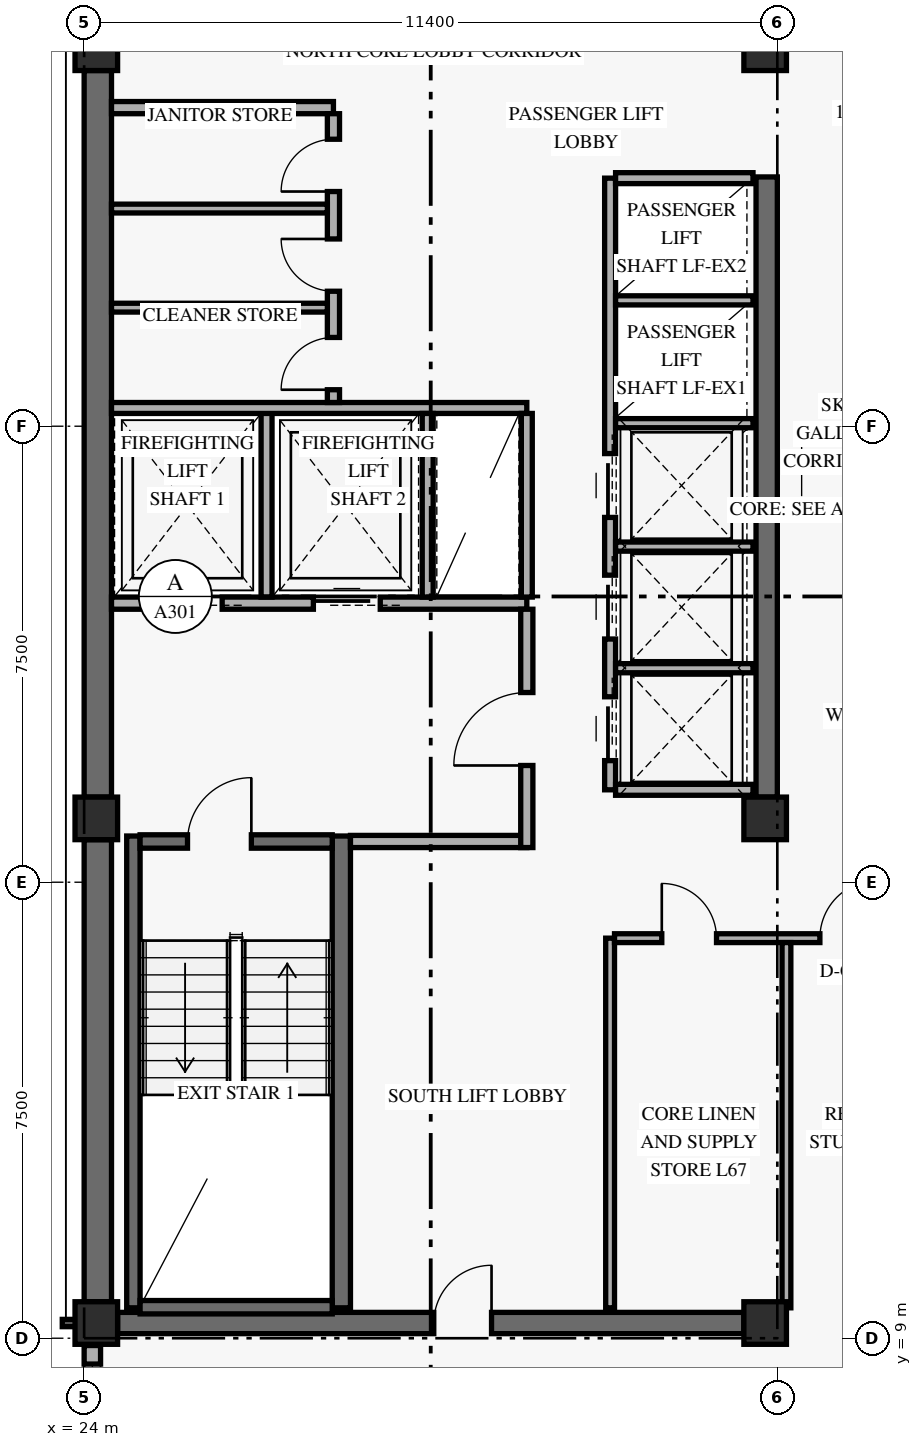
"""IFC4 building model, lengths in metres.
Left out: names, types, materials, properties, quantities, classifications, styles, units other than length and angle.
Written with IfcOpenShell. Run it as: python <this file> out.ifc"""

import sys

from ifc_helpers import new_model, si_unit, direction, frame, frame_2d, origin, origin_2d, place, context, subcontext, project, spatial, rectangle, extrude, element, fill, save


model = new_model("IFC4")
c1 = context("Model", 3, precision=1e-05, world=origin(), true_north=direction((0.0, 1.0)))
c2 = subcontext(c1, "Body", "Model", "MODEL_VIEW")
j1 = project(units=[si_unit("LENGTHUNIT", "METRE"), si_unit("PLANEANGLEUNIT", "RADIAN")], contexts=[c1])
p1 = place(None, origin())
s1 = spatial("IfcSite", under=j1, at=p1, CompositionType="ELEMENT")
p2 = place(p1, origin())
s2 = spatial("IfcBuilding", under=s1, at=p2, CompositionType="ELEMENT")
p3 = place(p2, frame((0.0, 0.0, 256.8)))
s3 = spatial("IfcBuildingStorey", under=s2, at=p3, CompositionType="ELEMENT", Elevation=256.8)
p4 = place(p3, frame((24.225, 9.6, 0.0), z_axis=(0.0, 0.0, 1.0), x_axis=(0.0, 1.0, 0.0)))
e1 = element("IfcWall", 1, at=p4, inside=s3, PredefinedType="SHEAR", context=c2, shape_type="SweptSolid", body=[
    extrude(rectangle(XDim=7.6, YDim=0.45, at=frame_2d((3.8, 0.0))), origin(), (0.0, 0.0, 1.0), 2.821),
])
p5 = place(p3, frame((24.225, 17.9, 0.0), z_axis=(0.0, 0.0, 1.0), x_axis=(0.0, 1.0, 0.0)))
e2 = element("IfcWall", 2, at=p5, inside=s3, PredefinedType="SHEAR", context=c2, shape_type="SweptSolid", body=[
    extrude(rectangle(XDim=11.95, YDim=0.45, at=frame_2d((5.975, 0.0))), origin(), (0.0, 0.0, 1.0), 2.821),
])
p6 = place(p3, frame((35.225, 17.9, 0.0), z_axis=(0.0, 0.0, 1.0), x_axis=(0.0, 1.0, 0.0)))
e3 = element("IfcWall", 3, at=p6, inside=s3, PredefinedType="SHEAR", context=c2, shape_type="SweptSolid", body=[
    extrude(rectangle(XDim=10.2, YDim=0.35, at=frame_2d((5.1, 0.0))), origin(), (0.0, 0.0, 1.0), 2.821),
])
p7 = place(p3, frame((24.55, 9.25, 0.0), z_axis=(0.0, 0.0, 1.0), x_axis=(1.0, 0.0, 0.0)))
e4 = element("IfcWall", 4, at=p7, inside=s3, PredefinedType="SHEAR", context=c2, shape_type="SweptSolid", body=[
    extrude(rectangle(XDim=10.3, YDim=0.35, at=frame_2d((5.15, 0.0))), origin(), (0.0, 0.0, 1.0), 3.36),
])
p8 = place(p7, frame((5.2, 0.0, 0.0)))
e5 = element("IfcOpeningElement", 5, at=p8, cuts=e4, PredefinedType="OPENING", context=c2, shape_type="SweptSolid", body=[
    extrude(rectangle(XDim=0.95, YDim=2.15, at=frame_2d((0.475, 1.075))), frame((0.0, 0.185, 0.0), z_axis=(0.0, -1.0, 0.0), x_axis=(1.0, 0.0, 0.0)), (0.0, 0.0, 1.0), 0.37),
])
p9 = place(p3, frame((24.81, 9.5, 0.0), z_axis=(0.0, 0.0, 1.0), x_axis=(0.0, 1.0, 0.0)))
e6 = element("IfcWall", 6, at=p9, inside=s3, PredefinedType="SHEAR", context=c2, shape_type="SweptSolid", body=[
    extrude(rectangle(XDim=7.76, YDim=0.22, at=frame_2d((3.88, 0.0))), origin(), (0.0, 0.0, 1.0), 3.36),
])
p10 = place(p3, frame((28.23, 9.5, 0.0), z_axis=(0.0, 0.0, 1.0), x_axis=(0.0, 1.0, 0.0)))
e7 = element("IfcWall", 7, at=p10, inside=s3, PredefinedType="SHEAR", context=c2, shape_type="SweptSolid", body=[
    extrude(rectangle(XDim=7.76, YDim=0.3, at=frame_2d((3.88, 0.0))), origin(), (0.0, 0.0, 1.0), 3.36),
])
p11 = place(p3, frame((24.92, 9.51, 0.0), z_axis=(0.0, 0.0, 1.0), x_axis=(1.0, 0.0, 0.0)))
e8 = element("IfcWall", 8, at=p11, inside=s3, PredefinedType="SHEAR", context=c2, shape_type="SweptSolid", body=[
    extrude(rectangle(XDim=3.16, YDim=0.22, at=frame_2d((1.58, 0.0))), origin(), (0.0, 0.0, 1.0), 3.36),
])
p12 = place(p3, frame((24.92, 17.17, 0.0), z_axis=(0.0, 0.0, 1.0), x_axis=(1.0, 0.0, 0.0)))
e9 = element("IfcWall", 9, at=p12, inside=s3, PredefinedType="SHEAR", context=c2, shape_type="SweptSolid", body=[
    extrude(rectangle(XDim=3.16, YDim=0.22, at=frame_2d((1.58, 0.0))), origin(), (0.0, 0.0, 1.0), 3.36),
])
p13 = place(p12, frame((0.78, 0.0, 0.0)))
e10 = element("IfcOpeningElement", 10, at=p13, cuts=e9, PredefinedType="OPENING", context=c2, shape_type="SweptSolid", body=[
    extrude(rectangle(XDim=1.05, YDim=2.15, at=frame_2d((0.525, 1.075))), frame((0.0, 0.12, 0.0), z_axis=(0.0, -1.0, 0.0), x_axis=(1.0, 0.0, 0.0)), (0.0, 0.0, 1.0), 0.24),
])
for number, where, z_axis, x_axis in (
    (11, (24.2, 9.25, 0.0), (0.0, 0.0, 1.0), (1.0, 0.0, 0.0)),
    (12, (24.2, 17.55, 0.0), (0.0, 0.0, 1.0), (1.0, 0.0, 0.0)),
    (13, (24.2, 30.2, 0.0), (0.0, 0.0, 1.0), (1.0, 0.0, 0.0)),
    (14, (35.2, 9.25, 0.0), (0.0, 0.0, 1.0), (1.0, 0.0, 0.0)),
    (15, (35.2, 17.55, 0.0), (0.0, 0.0, 1.0), (1.0, 0.0, 0.0)),
    (16, (35.2, 30.2, 0.0), (0.0, 0.0, 1.0), (1.0, 0.0, 0.0)),
):
    element("IfcColumn", number, at=place(p3, frame(where, z_axis=z_axis, x_axis=x_axis)), inside=s3, PredefinedType="COLUMN", context=c2, shape_type="SweptSolid", body=[
        extrude(rectangle(XDim=0.7, YDim=0.7, at=origin_2d()), origin(), (0.0, 0.0, 1.0), 3.6),
    ])
p14 = place(p3, frame((24.135, 7.32, 0.0), z_axis=(0.0, 0.0, 1.0), x_axis=(0.0, 1.0, 0.0)))
e17 = element("IfcWall", 17, at=p14, inside=s3, PredefinedType="SOLIDWALL", context=c2, shape_type="SweptSolid", body=[
    extrude(rectangle(XDim=1.56, YDim=0.27, at=frame_2d((0.78, 0.0))), origin(), (0.0, 0.0, 1.0), 2.803),
])
p15 = place(p14, frame((0.305, 0.0, 0.85)))
e18 = element("IfcOpeningElement", 18, at=p15, cuts=e17, PredefinedType="OPENING", context=c2, shape_type="SweptSolid", body=[
    extrude(rectangle(XDim=0.95, YDim=1.5, at=frame_2d((0.475, 0.75))), frame((0.0, 0.145, 0.0), z_axis=(0.0, -1.0, 0.0), x_axis=(1.0, 0.0, 0.0)), (0.0, 0.0, 1.0), 0.29),
])
p16 = place(p3, frame((24.45, 21.09, 0.0), z_axis=(0.0, 0.0, 1.0), x_axis=(1.0, 0.0, 0.0)))
e19 = element("IfcWall", 19, at=p16, inside=s3, PredefinedType="STANDARD", context=c2, shape_type="SweptSolid", body=[
    extrude(rectangle(XDim=6.83, YDim=0.2, at=frame_2d((3.415, 0.0))), origin(), (0.0, 0.0, 1.0), 3.36),
])
p17 = place(p16, frame((0.72, 0.0, 0.0)))
e20 = element("IfcOpeningElement", 20, at=p17, cuts=e19, PredefinedType="OPENING", context=c2, shape_type="SweptSolid", body=[
    extrude(rectangle(XDim=1.1, YDim=2.2, at=frame_2d((0.55, 1.1))), frame((0.0, 0.11, 0.0), z_axis=(0.0, -1.0, 0.0), x_axis=(1.0, 0.0, 0.0)), (0.0, 0.0, 1.0), 0.22),
])
p18 = place(p16, frame((3.32, 0.0, 0.0)))
e21 = element("IfcOpeningElement", 21, at=p18, cuts=e19, PredefinedType="OPENING", context=c2, shape_type="SweptSolid", body=[
    extrude(rectangle(XDim=1.1, YDim=2.2, at=frame_2d((0.55, 1.1))), frame((0.0, 0.11, 0.0), z_axis=(0.0, -1.0, 0.0), x_axis=(1.0, 0.0, 0.0)), (0.0, 0.0, 1.0), 0.22),
])
p19 = place(p3, frame((28.38, 17.17, 0.0), z_axis=(0.0, 0.0, 1.0), x_axis=(1.0, 0.0, 0.0)))
e22 = element("IfcWall", 22, at=p19, inside=s3, PredefinedType="STANDARD", context=c2, shape_type="SweptSolid", body=[
    extrude(rectangle(XDim=2.9, YDim=0.2, at=frame_2d((1.45, 0.0))), origin(), (0.0, 0.0, 1.0), 3.36),
])
p20 = place(p3, frame((31.28, 17.07, 0.0), z_axis=(0.0, 0.0, 1.0), x_axis=(0.0, 1.0, 0.0)))
e23 = element("IfcWall", 23, at=p20, inside=s3, PredefinedType="STANDARD", context=c2, shape_type="SweptSolid", body=[
    extrude(rectangle(XDim=3.92, YDim=0.2, at=frame_2d((1.96, 0.0))), origin(), (0.0, 0.0, 1.0), 2.803),
])
p21 = place(p20, frame((1.35, 0.0, 0.0)))
e24 = element("IfcOpeningElement", 24, at=p21, cuts=e23, PredefinedType="OPENING", context=c2, shape_type="SweptSolid", body=[
    extrude(rectangle(XDim=1.2, YDim=2.15, at=frame_2d((0.6, 1.075))), frame((0.0, 0.11, 0.0), z_axis=(0.0, -1.0, 0.0), x_axis=(1.0, 0.0, 0.0)), (0.0, 0.0, 1.0), 0.22),
])
p22 = place(p3, frame((27.0, 21.19, 0.0), z_axis=(0.0, 0.0, 1.0), x_axis=(0.0, 1.0, 0.0)))
e25 = element("IfcWall", 25, at=p22, inside=s3, PredefinedType="STANDARD", context=c2, shape_type="SweptSolid", body=[
    extrude(rectangle(XDim=3.11, YDim=0.18, at=frame_2d((1.555, 0.0))), origin(), (0.0, 0.0, 1.0), 3.36),
])
p23 = place(p3, frame((24.45, 24.3, 0.0), z_axis=(0.0, 0.0, 1.0), x_axis=(1.0, 0.0, 0.0)))
e26 = element("IfcWall", 26, at=p23, inside=s3, PredefinedType="STANDARD", context=c2, shape_type="SweptSolid", body=[
    extrude(rectangle(XDim=6.83, YDim=0.18, at=frame_2d((3.415, 0.0))), origin(), (0.0, 0.0, 1.0), 3.36),
])
for number, where, z_axis, x_axis in (
    (27, (29.65, 21.19, 0.0), (0.0, 0.0, 1.0), (0.0, 1.0, 0.0)),
    (28, (31.28, 21.19, 0.0), (0.0, 0.0, 1.0), (0.0, 1.0, 0.0)),
):
    element("IfcWall", number, at=place(p3, frame(where, z_axis=z_axis, x_axis=x_axis)), inside=s3, PredefinedType="STANDARD", context=c2, shape_type="SweptSolid", body=[
        extrude(rectangle(XDim=3.02, YDim=0.18, at=frame_2d((1.51, 0.0))), origin(), (0.0, 0.0, 1.0), 3.36),
    ])
p24 = place(p3, frame((24.45, 29.24, 0.0), z_axis=(0.0, 0.0, 1.0), x_axis=(1.0, 0.0, 0.0)))
e29 = element("IfcWall", 29, at=p24, inside=s3, PredefinedType="STANDARD", context=c2, shape_type="SweptSolid", body=[
    extrude(rectangle(XDim=3.65, YDim=0.2, at=frame_2d((1.825, 0.0))), origin(), (0.0, 0.0, 1.0), 3.36),
])
p25 = place(p3, frame((28.1, 24.39, 0.0), z_axis=(0.0, 0.0, 1.0), x_axis=(0.0, 1.0, 0.0)))
e30 = element("IfcWall", 30, at=p25, inside=s3, PredefinedType="STANDARD", context=c2, shape_type="SweptSolid", body=[
    extrude(rectangle(XDim=4.75, YDim=0.2, at=frame_2d((2.375, 0.0))), origin(), (0.0, 0.0, 1.0), 3.36),
])
p26 = place(p25, frame((0.21, 0.0, 0.0)))
e31 = element("IfcOpeningElement", 31, at=p26, cuts=e30, PredefinedType="OPENING", context=c2, shape_type="SweptSolid", body=[
    extrude(rectangle(XDim=0.86, YDim=2.1, at=frame_2d((0.43, 1.05))), frame((0.0, 0.11, 0.0), z_axis=(0.0, -1.0, 0.0), x_axis=(1.0, 0.0, 0.0)), (0.0, 0.0, 1.0), 0.22),
])
p27 = place(p25, frame((1.83, 0.0, 0.0)))
e32 = element("IfcOpeningElement", 32, at=p27, cuts=e30, PredefinedType="OPENING", context=c2, shape_type="SweptSolid", body=[
    extrude(rectangle(XDim=0.86, YDim=2.1, at=frame_2d((0.43, 1.05))), frame((0.0, 0.11, 0.0), z_axis=(0.0, -1.0, 0.0), x_axis=(1.0, 0.0, 0.0)), (0.0, 0.0, 1.0), 0.22),
])
p28 = place(p25, frame((3.47, 0.0, 0.0)))
e33 = element("IfcOpeningElement", 33, at=p28, cuts=e30, PredefinedType="OPENING", context=c2, shape_type="SweptSolid", body=[
    extrude(rectangle(XDim=0.86, YDim=2.1, at=frame_2d((0.43, 1.05))), frame((0.0, 0.11, 0.0), z_axis=(0.0, -1.0, 0.0), x_axis=(1.0, 0.0, 0.0)), (0.0, 0.0, 1.0), 0.22),
])
for number, where, z_axis, x_axis in (
    (34, (24.45, 25.95, 0.0), (0.0, 0.0, 1.0), (1.0, 0.0, 0.0)),
    (35, (24.45, 27.58, 0.0), (0.0, 0.0, 1.0), (1.0, 0.0, 0.0)),
):
    element("IfcWall", number, at=place(p3, frame(where, z_axis=z_axis, x_axis=x_axis)), inside=s3, PredefinedType="PARTITIONING", context=c2, shape_type="SweptSolid", body=[
        extrude(rectangle(XDim=3.55, YDim=0.145, at=frame_2d((1.775, 0.0))), origin(), (0.0, 0.0, 1.0), 3.36),
    ])
p29 = place(p3, frame((32.65, 18.02, 0.0), z_axis=(0.0, 0.0, 1.0), x_axis=(0.0, 1.0, 0.0)))
e36 = element("IfcWall", 36, at=p29, inside=s3, PredefinedType="STANDARD", context=c2, shape_type="SweptSolid", body=[
    extrude(rectangle(XDim=10.06, YDim=0.18, at=frame_2d((5.03, 0.0))), origin(), (0.0, 0.0, 1.0), 3.36),
])
p30 = place(p29, frame((0.48, 0.0, 0.0)))
e37 = element("IfcOpeningElement", 37, at=p30, cuts=e36, PredefinedType="OPENING", context=c2, shape_type="SweptSolid", body=[
    extrude(rectangle(XDim=1.05, YDim=2.2, at=frame_2d((0.525, 1.1))), frame((0.0, 0.1, 0.0), z_axis=(0.0, -1.0, 0.0), x_axis=(1.0, 0.0, 0.0)), (0.0, 0.0, 1.0), 0.2),
])
p31 = place(p29, frame((2.48, 0.0, 0.0)))
e38 = element("IfcOpeningElement", 38, at=p31, cuts=e36, PredefinedType="OPENING", context=c2, shape_type="SweptSolid", body=[
    extrude(rectangle(XDim=1.05, YDim=2.2, at=frame_2d((0.525, 1.1))), frame((0.0, 0.1, 0.0), z_axis=(0.0, -1.0, 0.0), x_axis=(1.0, 0.0, 0.0)), (0.0, 0.0, 1.0), 0.2),
])
p32 = place(p29, frame((4.48, 0.0, 0.0)))
e39 = element("IfcOpeningElement", 39, at=p32, cuts=e36, PredefinedType="OPENING", context=c2, shape_type="SweptSolid", body=[
    extrude(rectangle(XDim=1.05, YDim=2.2, at=frame_2d((0.525, 1.1))), frame((0.0, 0.1, 0.0), z_axis=(0.0, -1.0, 0.0), x_axis=(1.0, 0.0, 0.0)), (0.0, 0.0, 1.0), 0.2),
])
for number, where, z_axis, x_axis in (
    (40, (32.74, 18.02, 0.0), (0.0, 0.0, 1.0), (1.0, 0.0, 0.0)),
    (41, (32.74, 28.08, 0.0), (0.0, 0.0, 1.0), (1.0, 0.0, 0.0)),
):
    element("IfcWall", number, at=place(p3, frame(where, z_axis=z_axis, x_axis=x_axis)), inside=s3, PredefinedType="STANDARD", context=c2, shape_type="SweptSolid", body=[
        extrude(rectangle(XDim=2.26, YDim=0.18, at=frame_2d((1.13, 0.0))), origin(), (0.0, 0.0, 1.0), 3.36),
    ])
for number, where, z_axis, x_axis in (
    (42, (32.74, 20.02, 0.0), (0.0, 0.0, 1.0), (1.0, 0.0, 0.0)),
    (43, (32.74, 22.02, 0.0), (0.0, 0.0, 1.0), (1.0, 0.0, 0.0)),
    (44, (32.74, 24.05, 0.0), (0.0, 0.0, 1.0), (1.0, 0.0, 0.0)),
    (45, (32.74, 26.07, 0.0), (0.0, 0.0, 1.0), (1.0, 0.0, 0.0)),
):
    element("IfcWall", number, at=place(p3, frame(where, z_axis=z_axis, x_axis=x_axis)), inside=s3, PredefinedType="STANDARD", context=c2, shape_type="SweptSolid", body=[
        extrude(rectangle(XDim=2.26, YDim=0.15, at=frame_2d((1.13, 0.0))), origin(), (0.0, 0.0, 1.0), 3.36),
    ])
p33 = place(p3, frame((32.65, 9.5, 0.0), z_axis=(0.0, 0.0, 1.0), x_axis=(0.0, 1.0, 0.0)))
e46 = element("IfcWall", 46, at=p33, inside=s3, PredefinedType="PARTITIONING", context=c2, shape_type="SweptSolid", body=[
    extrude(rectangle(XDim=6.08, YDim=0.145, at=frame_2d((3.04, 0.0))), origin(), (0.0, 0.0, 1.0), 3.36),
])
p34 = place(p3, frame((32.722, 15.58, 0.0), z_axis=(0.0, 0.0, 1.0), x_axis=(1.0, 0.0, 0.0)))
e47 = element("IfcWall", 47, at=p34, inside=s3, PredefinedType="PARTITIONING", context=c2, shape_type="SweptSolid", body=[
    extrude(rectangle(XDim=5.628, YDim=0.145, at=frame_2d((2.814, 0.0))), origin(), (0.0, 0.0, 1.0), 2.803),
])
p35 = place(p34, frame((0.778, 0.0, 0.0)))
e48 = element("IfcOpeningElement", 48, at=p35, cuts=e47, PredefinedType="OPENING", context=c2, shape_type="SweptSolid", body=[
    extrude(rectangle(XDim=0.9, YDim=2.1, at=frame_2d((0.45, 1.05))), frame((0.0, 0.083, 0.0), z_axis=(0.0, -1.0, 0.0), x_axis=(1.0, 0.0, 0.0)), (0.0, 0.0, 1.0), 0.165),
])
p36 = place(p34, frame((3.377, 0.0, 0.0)))
e49 = element("IfcOpeningElement", 49, at=p36, cuts=e47, PredefinedType="OPENING", context=c2, shape_type="SweptSolid", body=[
    extrude(rectangle(XDim=0.95, YDim=2.15, at=frame_2d((0.475, 1.075))), frame((0.0, 0.083, 0.0), z_axis=(0.0, -1.0, 0.0), x_axis=(1.0, 0.0, 0.0)), (0.0, 0.0, 1.0), 0.165),
])
p37 = place(p3, frame((35.55, 9.5, 0.0), z_axis=(0.0, 0.0, 1.0), x_axis=(0.0, 1.0, 0.0)))
e50 = element("IfcWall", 50, at=p37, inside=s3, PredefinedType="PARTITIONING", context=c2, shape_type="SweptSolid", body=[
    extrude(rectangle(XDim=6.008, YDim=0.145, at=frame_2d((3.004, 0.0))), origin(), (0.0, 0.0, 1.0), 3.039),
])
p38 = place(p15, origin())
e51 = element("IfcWindow", 51, at=p38, inside=s3, PartitioningType="SINGLE_PANEL", PredefinedType="WINDOW", context=c2, shape_type="SweptSolid", body=[
    extrude(rectangle(XDim=0.95, YDim=1.5, at=frame_2d((0.475, 0.75))), frame((0.0, 0.03, 0.0), z_axis=(0.0, -1.0, 0.0), x_axis=(1.0, 0.0, 0.0)), (0.0, 0.0, 1.0), 0.06),
])
fill(e18, e51)
p39 = place(p13, frame((1.05, 0.0, 0.0), z_axis=(0.0, 0.0, 1.0), x_axis=(-1.0, 0.0, 0.0)))
e52 = element("IfcDoor", 52, at=p39, inside=s3, OperationType="SINGLE_SWING_LEFT", PredefinedType="DOOR", context=c2, shape_type="SweptSolid", body=[
    extrude(rectangle(XDim=1.05, YDim=2.15, at=frame_2d((0.525, 1.075))), frame((0.0, 0.025, 0.0), z_axis=(0.0, -1.0, 0.0), x_axis=(1.0, 0.0, 0.0)), (0.0, 0.0, 1.0), 0.05),
])
fill(e10, e52)
p40 = place(p17, origin())
e53 = element("IfcDoor", 53, at=p40, inside=s3, OperationType="SLIDING_TO_LEFT", PredefinedType="DOOR", context=c2, shape_type="SweptSolid", body=[
    extrude(rectangle(XDim=1.1, YDim=2.2, at=frame_2d((0.55, 1.1))), frame((0.0, 0.025, 0.0), z_axis=(0.0, -1.0, 0.0), x_axis=(1.0, 0.0, 0.0)), (0.0, 0.0, 1.0), 0.05),
])
fill(e20, e53)
p41 = place(p18, origin())
e54 = element("IfcDoor", 54, at=p41, inside=s3, OperationType="SLIDING_TO_LEFT", PredefinedType="DOOR", context=c2, shape_type="SweptSolid", body=[
    extrude(rectangle(XDim=1.1, YDim=2.2, at=frame_2d((0.55, 1.1))), frame((0.0, 0.025, 0.0), z_axis=(0.0, -1.0, 0.0), x_axis=(1.0, 0.0, 0.0)), (0.0, 0.0, 1.0), 0.05),
])
fill(e21, e54)
p42 = place(p21, origin())
e55 = element("IfcDoor", 55, at=p42, inside=s3, OperationType="SINGLE_SWING_LEFT", PredefinedType="DOOR", context=c2, shape_type="SweptSolid", body=[
    extrude(rectangle(XDim=1.2, YDim=2.15, at=frame_2d((0.6, 1.075))), frame((0.0, 0.025, 0.0), z_axis=(0.0, -1.0, 0.0), x_axis=(1.0, 0.0, 0.0)), (0.0, 0.0, 1.0), 0.05),
])
fill(e24, e55)
p43 = place(p26, origin())
e56 = element("IfcDoor", 56, at=p43, inside=s3, OperationType="SINGLE_SWING_LEFT", PredefinedType="DOOR", context=c2, shape_type="SweptSolid", body=[
    extrude(rectangle(XDim=0.86, YDim=2.1, at=frame_2d((0.43, 1.05))), frame((0.0, 0.025, 0.0), z_axis=(0.0, -1.0, 0.0), x_axis=(1.0, 0.0, 0.0)), (0.0, 0.0, 1.0), 0.05),
])
fill(e31, e56)
p44 = place(p27, origin())
e57 = element("IfcDoor", 57, at=p44, inside=s3, OperationType="SINGLE_SWING_RIGHT", PredefinedType="DOOR", context=c2, shape_type="SweptSolid", body=[
    extrude(rectangle(XDim=0.86, YDim=2.1, at=frame_2d((0.43, 1.05))), frame((0.0, 0.025, 0.0), z_axis=(0.0, -1.0, 0.0), x_axis=(1.0, 0.0, 0.0)), (0.0, 0.0, 1.0), 0.05),
])
fill(e32, e57)
p45 = place(p28, origin())
e58 = element("IfcDoor", 58, at=p45, inside=s3, OperationType="SINGLE_SWING_LEFT", PredefinedType="DOOR", context=c2, shape_type="SweptSolid", body=[
    extrude(rectangle(XDim=0.86, YDim=2.1, at=frame_2d((0.43, 1.05))), frame((0.0, 0.025, 0.0), z_axis=(0.0, -1.0, 0.0), x_axis=(1.0, 0.0, 0.0)), (0.0, 0.0, 1.0), 0.05),
])
fill(e33, e58)
p46 = place(p30, origin())
e59 = element("IfcDoor", 59, at=p46, inside=s3, OperationType="SLIDING_TO_LEFT", PredefinedType="DOOR", context=c2, shape_type="SweptSolid", body=[
    extrude(rectangle(XDim=1.05, YDim=2.2, at=frame_2d((0.525, 1.1))), frame((0.0, 0.025, 0.0), z_axis=(0.0, -1.0, 0.0), x_axis=(1.0, 0.0, 0.0)), (0.0, 0.0, 1.0), 0.05),
])
fill(e37, e59)
p47 = place(p31, origin())
e60 = element("IfcDoor", 60, at=p47, inside=s3, OperationType="SLIDING_TO_LEFT", PredefinedType="DOOR", context=c2, shape_type="SweptSolid", body=[
    extrude(rectangle(XDim=1.05, YDim=2.2, at=frame_2d((0.525, 1.1))), frame((0.0, 0.025, 0.0), z_axis=(0.0, -1.0, 0.0), x_axis=(1.0, 0.0, 0.0)), (0.0, 0.0, 1.0), 0.05),
])
fill(e38, e60)
p48 = place(p32, origin())
e61 = element("IfcDoor", 61, at=p48, inside=s3, OperationType="SLIDING_TO_LEFT", PredefinedType="DOOR", context=c2, shape_type="SweptSolid", body=[
    extrude(rectangle(XDim=1.05, YDim=2.2, at=frame_2d((0.525, 1.1))), frame((0.0, 0.025, 0.0), z_axis=(0.0, -1.0, 0.0), x_axis=(1.0, 0.0, 0.0)), (0.0, 0.0, 1.0), 0.05),
])
fill(e39, e61)
p49 = place(p35, origin())
e62 = element("IfcDoor", 62, at=p49, inside=s3, OperationType="SINGLE_SWING_LEFT", PredefinedType="DOOR", context=c2, shape_type="SweptSolid", body=[
    extrude(rectangle(XDim=0.9, YDim=2.1, at=frame_2d((0.45, 1.05))), frame((0.0, 0.025, 0.0), z_axis=(0.0, -1.0, 0.0), x_axis=(1.0, 0.0, 0.0)), (0.0, 0.0, 1.0), 0.05),
])
fill(e48, e62)
p50 = place(p36, origin())
e63 = element("IfcDoor", 63, at=p50, inside=s3, OperationType="SINGLE_SWING_RIGHT", PredefinedType="DOOR", context=c2, shape_type="SweptSolid", body=[
    extrude(rectangle(XDim=0.95, YDim=2.15, at=frame_2d((0.475, 1.075))), frame((0.0, 0.025, 0.0), z_axis=(0.0, -1.0, 0.0), x_axis=(1.0, 0.0, 0.0)), (0.0, 0.0, 1.0), 0.05),
])
fill(e49, e63)
p51 = place(p8, frame((0.95, 0.0, 0.0), z_axis=(0.0, 0.0, 1.0), x_axis=(-1.0, 0.0, 0.0)))
e64 = element("IfcDoor", 64, at=p51, inside=s3, OperationType="SINGLE_SWING_LEFT", PredefinedType="DOOR", context=c2, shape_type="SweptSolid", body=[
    extrude(rectangle(XDim=0.95, YDim=2.15, at=frame_2d((0.475, 1.075))), frame((0.0, 0.025, 0.0), z_axis=(0.0, -1.0, 0.0), x_axis=(1.0, 0.0, 0.0)), (0.0, 0.0, 1.0), 0.05),
])
fill(e5, e64)
save(model, sys.argv[1])
